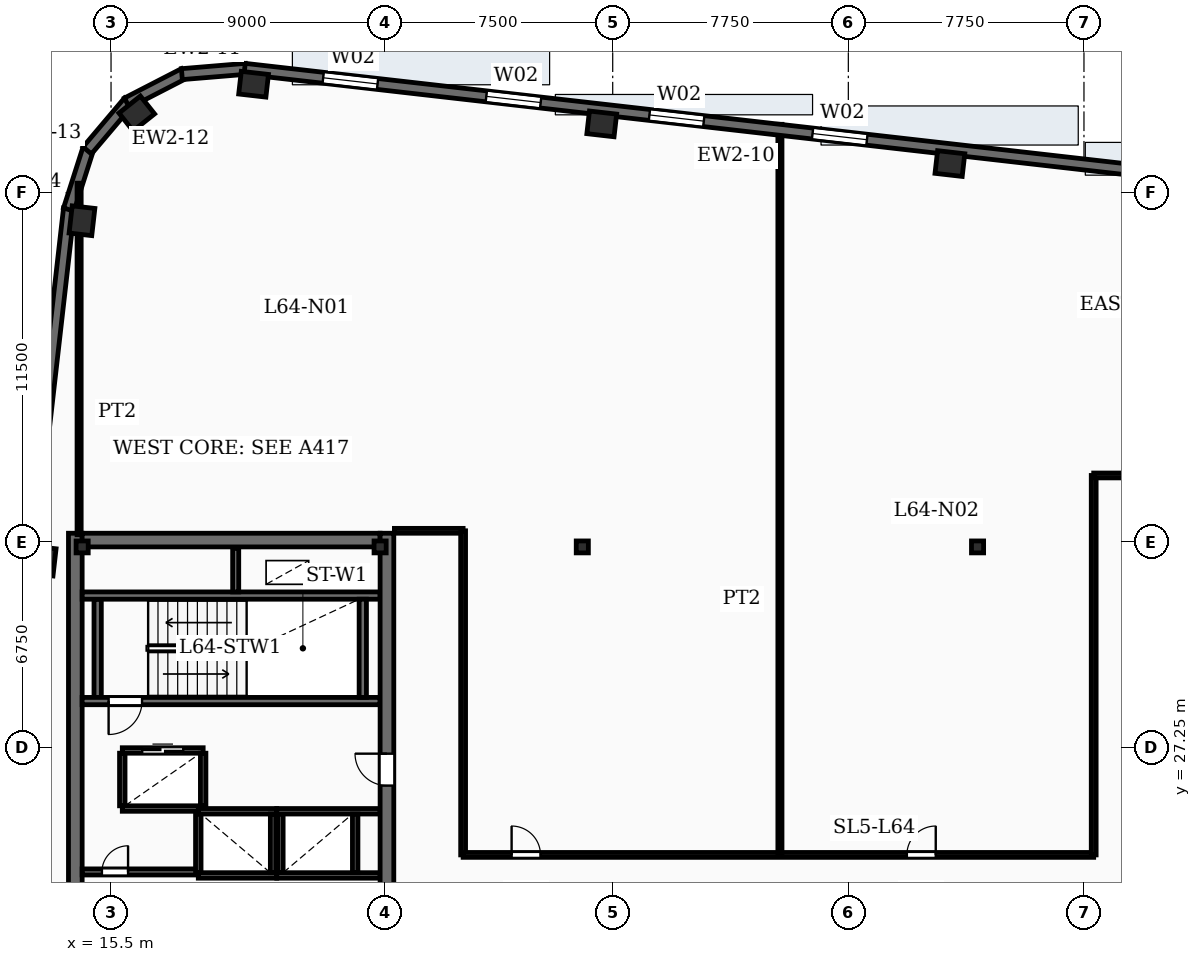
"""IFC4 building model, lengths in metres.
Left out: names, types, materials, properties, quantities, classifications, styles, units other than length and angle.
Written with IfcOpenShell. Run it as: python <this file> out.ifc"""

import sys

from ifc_helpers import new_model, si_unit, direction, frame, frame_2d, origin, origin_2d, place, context, subcontext, project, spatial, rectangle, i_section, extrude, element, fill, save


model = new_model("IFC4")
c1 = context("Model", 3, precision=1e-05, world=origin(), true_north=direction((0.0, 1.0)))
c2 = subcontext(c1, "Body", "Model", "MODEL_VIEW")
j1 = project(units=[si_unit("LENGTHUNIT", "METRE"), si_unit("PLANEANGLEUNIT", "RADIAN")], contexts=[c1])
p1 = place(None, origin())
s1 = spatial("IfcSite", under=j1, at=p1, CompositionType="ELEMENT")
p2 = place(p1, origin())
s2 = spatial("IfcBuilding", under=s1, at=p2, CompositionType="ELEMENT")
p3 = place(p2, frame((0.0, 0.0, 262.2)))
s3 = spatial("IfcBuildingStorey", under=s2, at=p3, CompositionType="ELEMENT", Elevation=262.2)
p4 = place(p3, frame((14.325, 19.0, -0.27), z_axis=(0.0, 0.0, 1.0), x_axis=(0.0, 1.0, 0.0)))
e1 = element("IfcWall", 1, at=p4, inside=s3, PredefinedType="SHEAR", context=c2, shape_type="SweptSolid", body=[
    extrude(rectangle(XDim=15.3, YDim=0.45, at=frame_2d((7.65, 0.0))), origin(), (0.0, 0.0, 1.0), 3.75),
])
p5 = place(p3, frame((24.575, 19.0, -0.27), z_axis=(0.0, 0.0, 1.0), x_axis=(0.0, 1.0, 0.0)))
e2 = element("IfcWall", 2, at=p5, inside=s3, PredefinedType="SHEAR", context=c2, shape_type="SweptSolid", body=[
    extrude(rectangle(XDim=15.3, YDim=0.45, at=frame_2d((7.65, 0.0))), origin(), (0.0, 0.0, 1.0), 3.75),
])
p6 = place(p5, frame((2.5, 0.0, 0.27)))
e3 = element("IfcOpeningElement", 3, at=p6, cuts=e2, PredefinedType="OPENING", context=c2, shape_type="SweptSolid", body=[
    extrude(rectangle(XDim=1.05, YDim=2.15, at=frame_2d((0.525, 1.075))), frame((0.0, 0.235, 0.0), z_axis=(0.0, -1.0, 0.0), x_axis=(1.0, 0.0, 0.0)), (0.0, 0.0, 1.0), 0.47),
])
p7 = place(p5, frame((7.0, 0.0, 0.27)))
e4 = element("IfcOpeningElement", 4, at=p7, cuts=e2, PredefinedType="OPENING", context=c2, shape_type="SweptSolid", body=[
    extrude(rectangle(XDim=1.05, YDim=2.15, at=frame_2d((0.525, 1.075))), frame((0.0, 0.235, 0.0), z_axis=(0.0, -1.0, 0.0), x_axis=(1.0, 0.0, 0.0)), (0.0, 0.0, 1.0), 0.47),
])
p8 = place(p3, frame((14.55, 34.075, -0.27), z_axis=(0.0, 0.0, 1.0), x_axis=(1.0, 0.0, 0.0)))
e5 = element("IfcWall", 5, at=p8, inside=s3, PredefinedType="SHEAR", context=c2, shape_type="SweptSolid", body=[
    extrude(rectangle(XDim=9.8, YDim=0.45, at=frame_2d((4.9, 0.0))), origin(), (0.0, 0.0, 1.0), 3.75),
])
for number, where, z_axis, x_axis in (
    (6, (14.55, 33.85, -0.27), (0.0, 0.0, 1.0), (1.0, 0.0, 0.0)),
    (7, (24.35, 33.85, -0.27), (0.0, 0.0, 1.0), (1.0, 0.0, 0.0)),
    (8, (31.0, 33.85, -0.27), (0.0, 0.0, 1.0), (1.0, 0.0, 0.0)),
    (9, (44.0, 33.85, -0.27), (0.0, 0.0, 1.0), (1.0, 0.0, 0.0)),
):
    element("IfcColumn", number, at=place(p3, frame(where, z_axis=z_axis, x_axis=x_axis)), inside=s3, PredefinedType="COLUMN", context=c2, shape_type="SweptSolid", body=[
        extrude(i_section(OverallWidth=0.399, OverallDepth=0.393, WebThickness=0.023, FlangeThickness=0.037, FilletRadius=0.02, at=origin_2d()), origin(), (0.0, 0.0, 1.0), 3.75),
    ])
for number, where, z_axis, x_axis in (
    (10, (43.091, 46.458, -0.27), (0.0, 0.0, 1.0), (0.994, -0.113, 0.0)),
    (11, (31.64, 47.763, -0.27), (0.0, 0.0, 1.0), (0.994, -0.113, 0.0)),
    (12, (20.189, 49.068, -0.27), (0.0, 0.0, 1.0), (0.994, -0.113, 0.0)),
    (13, (16.346, 48.105, -0.27), (0.0, 0.0, 1.0), (0.783, 0.623, 0.0)),
    (14, (14.544, 44.578, -0.27), (0.0, 0.0, 1.0), (0.113, 0.994, 0.0)),
    (15, (13.269, 33.384, -0.27), (0.0, 0.0, 1.0), (0.113, 0.994, 0.0)),
):
    element("IfcColumn", number, at=place(p3, frame(where, z_axis=z_axis, x_axis=x_axis)), inside=s3, PredefinedType="COLUMN", context=c2, shape_type="SweptSolid", body=[
        extrude(rectangle(XDim=0.9, YDim=0.75, at=origin_2d()), origin(), (0.0, 0.0, 1.0), 3.75),
    ])
p9 = place(p3, frame((19.894, 49.575, 0.0), z_axis=(0.0, 0.0, 1.0), x_axis=(0.993571439016, -0.113206870688, 0.0)))
e16 = element("IfcWall", 16, at=p9, inside=s3, PredefinedType="SOLIDWALL", context=c2, shape_type="SweptSolid", body=[
    extrude(rectangle(XDim=46.8, YDim=0.36, at=frame_2d((23.4, 0.0))), origin(), (0.0, 0.0, 1.0), 3.48),
])
p10 = place(p9, frame((2.6, 0.0, 0.88)))
e17 = element("IfcOpeningElement", 17, at=p10, cuts=e16, PredefinedType="OPENING", context=c2, shape_type="SweptSolid", body=[
    extrude(rectangle(XDim=1.8, YDim=2.15, at=frame_2d((0.9, 1.075))), frame((0.0, 0.19, 0.0), z_axis=(0.0, -1.0, 0.0), x_axis=(1.0, 0.0, 0.0)), (0.0, 0.0, 1.0), 0.38),
])
p11 = place(p9, frame((8.0, 0.0, 0.88)))
e18 = element("IfcOpeningElement", 18, at=p11, cuts=e16, PredefinedType="OPENING", context=c2, shape_type="SweptSolid", body=[
    extrude(rectangle(XDim=1.8, YDim=2.15, at=frame_2d((0.9, 1.075))), frame((0.0, 0.19, 0.0), z_axis=(0.0, -1.0, 0.0), x_axis=(1.0, 0.0, 0.0)), (0.0, 0.0, 1.0), 0.38),
])
p12 = place(p9, frame((13.4, 0.0, 0.88)))
e19 = element("IfcOpeningElement", 19, at=p12, cuts=e16, PredefinedType="OPENING", context=c2, shape_type="SweptSolid", body=[
    extrude(rectangle(XDim=1.8, YDim=2.15, at=frame_2d((0.9, 1.075))), frame((0.0, 0.19, 0.0), z_axis=(0.0, -1.0, 0.0), x_axis=(1.0, 0.0, 0.0)), (0.0, 0.0, 1.0), 0.38),
])
p13 = place(p9, frame((18.8, 0.0, 0.88)))
e20 = element("IfcOpeningElement", 20, at=p13, cuts=e16, PredefinedType="OPENING", context=c2, shape_type="SweptSolid", body=[
    extrude(rectangle(XDim=1.8, YDim=2.15, at=frame_2d((0.9, 1.075))), frame((0.0, 0.19, 0.0), z_axis=(0.0, -1.0, 0.0), x_axis=(1.0, 0.0, 0.0)), (0.0, 0.0, 1.0), 0.38),
])
p14 = place(p9, frame((29.6, 0.0, 0.88)))
e21 = element("IfcOpeningElement", 21, at=p14, cuts=e16, PredefinedType="OPENING", context=c2, shape_type="SweptSolid", body=[
    extrude(rectangle(XDim=1.8, YDim=2.15, at=frame_2d((0.9, 1.075))), frame((0.0, 0.19, 0.0), z_axis=(0.0, -1.0, 0.0), x_axis=(1.0, 0.0, 0.0)), (0.0, 0.0, 1.0), 0.38),
])
for number, where, z_axis, x_axis in (
    (22, (17.83, 49.399, 0.0), (0.0, 0.0, 1.0), (0.997, 0.083, 0.0)),
    (23, (16.024, 48.454, 0.0), (0.0, 0.0, 1.0), (0.889, 0.458, 0.0)),
    (24, (14.718, 46.89, 0.0), (0.0, 0.0, 1.0), (0.646, 0.763, 0.0)),
):
    element("IfcWall", number, at=place(p3, frame(where, z_axis=z_axis, x_axis=x_axis)), inside=s3, PredefinedType="SOLIDWALL", context=c2, shape_type="SweptSolid", body=[
        extrude(rectangle(XDim=2.107, YDim=0.36, at=frame_2d((1.054, 0.0))), origin(), (0.0, 0.0, 1.0), 3.48),
    ])
p15 = place(p3, frame((14.109, 44.945, 0.0), z_axis=(0.0, 0.0, 1.0), x_axis=(0.304872429864, 0.952393196904, 0.0)))
e25 = element("IfcWall", 25, at=p15, inside=s3, PredefinedType="SOLIDWALL", context=c2, shape_type="SweptSolid", body=[
    extrude(rectangle(XDim=2.107, YDim=0.36, at=frame_2d((1.053, 0.0))), origin(), (0.0, 0.0, 1.0), 3.48),
])
p16 = place(p3, frame((10.211, 10.701, 0.0), z_axis=(0.0, 0.0, 1.0), x_axis=(0.113203107947, 0.993571867733, 0.0)))
e26 = element("IfcWall", 26, at=p16, inside=s3, PredefinedType="SOLIDWALL", context=c2, shape_type="SweptSolid", body=[
    extrude(rectangle(XDim=34.5, YDim=0.36, at=frame_2d((17.25, 0.0))), origin(), (0.0, 0.0, 1.0), 3.48),
])
p17 = place(p16, frame((4.2, 0.0, 0.88)))
e27 = element("IfcOpeningElement", 27, at=p17, cuts=e26, PredefinedType="OPENING", context=c2, shape_type="SweptSolid", body=[
    extrude(rectangle(XDim=1.35, YDim=2.2, at=frame_2d((0.675, 1.1))), frame((0.0, 0.19, 0.0), z_axis=(0.0, -1.0, 0.0), x_axis=(1.0, 0.0, 0.0)), (0.0, 0.0, 1.0), 0.38),
])
p18 = place(p16, frame((15.4, 0.0, 0.88)))
e28 = element("IfcOpeningElement", 28, at=p18, cuts=e26, PredefinedType="OPENING", context=c2, shape_type="SweptSolid", body=[
    extrude(rectangle(XDim=1.35, YDim=2.2, at=frame_2d((0.675, 1.1))), frame((0.0, 0.19, 0.0), z_axis=(0.0, -1.0, 0.0), x_axis=(1.0, 0.0, 0.0)), (0.0, 0.0, 1.0), 0.38),
])
p19 = place(p16, frame((26.6, 0.0, 0.88)))
e29 = element("IfcOpeningElement", 29, at=p19, cuts=e26, PredefinedType="OPENING", context=c2, shape_type="SweptSolid", body=[
    extrude(rectangle(XDim=1.35, YDim=2.2, at=frame_2d((0.675, 1.1))), frame((0.0, 0.19, 0.0), z_axis=(0.0, -1.0, 0.0), x_axis=(1.0, 0.0, 0.0)), (0.0, 0.0, 1.0), 0.38),
])
p20 = place(p3, frame((24.35, 28.78, 0.0), z_axis=(0.0, 0.0, 1.0), x_axis=(-1.0, 0.0, 0.0)))
e30 = element("IfcWall", 30, at=p20, inside=s3, PredefinedType="SOLIDWALL", context=c2, shape_type="SweptSolid", body=[
    extrude(rectangle(XDim=9.8, YDim=0.24, at=frame_2d((4.9, 0.0))), origin(), (0.0, 0.0, 1.0), 3.48),
])
p21 = place(p20, frame((7.83, 0.0, 0.0)))
e31 = element("IfcOpeningElement", 31, at=p21, cuts=e30, PredefinedType="OPENING", context=c2, shape_type="SweptSolid", body=[
    extrude(rectangle(XDim=1.1, YDim=2.15, at=frame_2d((0.55, 1.075))), frame((0.0, 0.13, 0.0), z_axis=(0.0, -1.0, 0.0), x_axis=(1.0, 0.0, 0.0)), (0.0, 0.0, 1.0), 0.26),
])
p22 = place(p3, frame((14.55, 32.25, 0.0), z_axis=(0.0, 0.0, 1.0), x_axis=(1.0, 0.0, 0.0)))
e32 = element("IfcWall", 32, at=p22, inside=s3, PredefinedType="SOLIDWALL", context=c2, shape_type="SweptSolid", body=[
    extrude(rectangle(XDim=9.8, YDim=0.24, at=frame_2d((4.9, 0.0))), origin(), (0.0, 0.0, 1.0), 3.48),
])
for number, where, z_axis, x_axis in (
    (33, (15.06, 28.9, 0.0), (0.0, 0.0, 1.0), (0.0, 1.0, 0.0)),
    (34, (23.78, 28.9, 0.0), (0.0, 0.0, 1.0), (0.0, 1.0, 0.0)),
):
    element("IfcWall", number, at=place(p3, frame(where, z_axis=z_axis, x_axis=x_axis)), inside=s3, PredefinedType="SOLIDWALL", context=c2, shape_type="SweptSolid", body=[
        extrude(rectangle(XDim=3.23, YDim=0.24, at=frame_2d((1.615, 0.0))), origin(), (0.0, 0.0, 1.0), 3.48),
    ])
p23 = place(p3, frame((19.6, 32.37, 0.0), z_axis=(0.0, 0.0, 1.0), x_axis=(0.0, 1.0, 0.0)))
e35 = element("IfcWall", 35, at=p23, inside=s3, PredefinedType="SOLIDWALL", context=c2, shape_type="SweptSolid", body=[
    extrude(rectangle(XDim=1.43, YDim=0.2, at=frame_2d((0.715, 0.0))), origin(), (0.0, 0.0, 1.0), 3.48),
])
for number, where, z_axis, x_axis in (
    (36, (18.37, 25.155, 0.0), (0.0, 0.0, 1.0), (1.0, 0.0, 0.0)),
    (37, (18.37, 23.045, 0.0), (0.0, 0.0, 1.0), (1.0, 0.0, 0.0)),
):
    element("IfcWall", number, at=place(p3, frame(where, z_axis=z_axis, x_axis=x_axis)), inside=s3, PredefinedType="SOLIDWALL", context=c2, shape_type="SweptSolid", body=[
        extrude(rectangle(XDim=2.58, YDim=0.18, at=frame_2d((1.29, 0.0))), origin(), (0.0, 0.0, 1.0), 3.48),
    ])
for number, where, z_axis, x_axis in (
    (38, (18.37, 23.135, 0.0), (0.0, 0.0, 1.0), (0.0, 1.0, 0.0)),
    (39, (20.83, 23.135, 0.0), (0.0, 0.0, 1.0), (0.0, 1.0, 0.0)),
):
    element("IfcWall", number, at=place(p3, frame(where, z_axis=z_axis, x_axis=x_axis)), inside=s3, PredefinedType="SOLIDWALL", context=c2, shape_type="SweptSolid", body=[
        extrude(rectangle(XDim=1.93, YDim=0.18, at=frame_2d((0.965, 0.0))), origin(), (0.0, 0.0, 1.0), 3.48),
    ])
for number, where, z_axis, x_axis in (
    (40, (20.95, 25.155, 0.0), (0.0, 0.0, 1.0), (1.0, 0.0, 0.0)),
    (41, (20.95, 23.045, 0.0), (0.0, 0.0, 1.0), (1.0, 0.0, 0.0)),
):
    element("IfcWall", number, at=place(p3, frame(where, z_axis=z_axis, x_axis=x_axis)), inside=s3, PredefinedType="SOLIDWALL", context=c2, shape_type="SweptSolid", body=[
        extrude(rectangle(XDim=3.4, YDim=0.18, at=frame_2d((1.7, 0.0))), origin(), (0.0, 0.0, 1.0), 3.48),
    ])
for number, where, z_axis, x_axis in (
    (42, (21.07, 23.135, 0.0), (0.0, 0.0, 1.0), (0.0, 1.0, 0.0)),
    (43, (23.53, 23.135, 0.0), (0.0, 0.0, 1.0), (0.0, 1.0, 0.0)),
):
    element("IfcWall", number, at=place(p3, frame(where, z_axis=z_axis, x_axis=x_axis)), inside=s3, PredefinedType="SOLIDWALL", context=c2, shape_type="SweptSolid", body=[
        extrude(rectangle(XDim=1.93, YDim=0.18, at=frame_2d((0.965, 0.0))), origin(), (0.0, 0.0, 1.0), 3.48),
    ])
p24 = place(p3, frame((15.87, 27.155, 0.0), z_axis=(0.0, 0.0, 1.0), x_axis=(1.0, 0.0, 0.0)))
e44 = element("IfcWall", 44, at=p24, inside=s3, PredefinedType="SOLIDWALL", context=c2, shape_type="SweptSolid", body=[
    extrude(rectangle(XDim=2.66, YDim=0.18, at=frame_2d((1.33, 0.0))), origin(), (0.0, 0.0, 1.0), 3.48),
])
p25 = place(p24, frame((0.655, 0.0, 0.0)))
e45 = element("IfcOpeningElement", 45, at=p25, cuts=e44, PredefinedType="OPENING", context=c2, shape_type="SweptSolid", body=[
    extrude(rectangle(XDim=1.35, YDim=2.3, at=frame_2d((0.675, 1.15))), frame((0.0, 0.1, 0.0), z_axis=(0.0, -1.0, 0.0), x_axis=(1.0, 0.0, 0.0)), (0.0, 0.0, 1.0), 0.2),
])
p26 = place(p3, frame((15.87, 25.245, 0.0), z_axis=(0.0, 0.0, 1.0), x_axis=(1.0, 0.0, 0.0)))
e46 = element("IfcWall", 46, at=p26, inside=s3, PredefinedType="SOLIDWALL", context=c2, shape_type="SweptSolid", body=[
    extrude(rectangle(XDim=2.66, YDim=0.18, at=frame_2d((1.33, 0.0))), origin(), (0.0, 0.0, 1.0), 3.48),
])
for number, where, z_axis, x_axis in (
    (47, (15.87, 25.335, 0.0), (0.0, 0.0, 1.0), (0.0, 1.0, 0.0)),
    (48, (18.53, 25.335, 0.0), (0.0, 0.0, 1.0), (0.0, 1.0, 0.0)),
):
    element("IfcWall", number, at=place(p3, frame(where, z_axis=z_axis, x_axis=x_axis)), inside=s3, PredefinedType="SOLIDWALL", context=c2, shape_type="SweptSolid", body=[
        extrude(rectangle(XDim=1.73, YDim=0.18, at=frame_2d((0.865, 0.0))), origin(), (0.0, 0.0, 1.0), 3.48),
    ])
p27 = place(p3, frame((14.55, 23.16, 0.0), z_axis=(0.0, 0.0, 1.0), x_axis=(1.0, 0.0, 0.0)))
e49 = element("IfcWall", 49, at=p27, inside=s3, PredefinedType="SOLIDWALL", context=c2, shape_type="SweptSolid", body=[
    extrude(rectangle(XDim=3.82, YDim=0.2, at=frame_2d((1.91, 0.0))), origin(), (0.0, 0.0, 1.0), 2.54),
])
p28 = place(p27, frame((0.65, 0.0, 0.0)))
e50 = element("IfcOpeningElement", 50, at=p28, cuts=e49, PredefinedType="OPENING", context=c2, shape_type="SweptSolid", body=[
    extrude(rectangle(XDim=0.86, YDim=2.05, at=frame_2d((0.43, 1.025))), frame((0.0, 0.11, 0.0), z_axis=(0.0, -1.0, 0.0), x_axis=(1.0, 0.0, 0.0)), (0.0, 0.0, 1.0), 0.22),
])
p29 = place(p3, frame((37.5, 23.72, 0.0), z_axis=(0.0, 0.0, 1.0), x_axis=(0.0, 1.0, 0.0)))
e51 = element("IfcWall", 51, at=p29, inside=s3, PredefinedType="PARTITIONING", context=c2, shape_type="SweptSolid", body=[
    extrude(rectangle(XDim=24.03, YDim=0.135, at=frame_2d((12.015, 0.0))), origin(), (0.0, 0.0, 1.0), 2.54),
])
p30 = place(p3, frame((14.45, 34.25, 0.0), z_axis=(0.0, 0.0, 1.0), x_axis=(0.0, 1.0, 0.0)))
e52 = element("IfcWall", 52, at=p30, inside=s3, PredefinedType="PARTITIONING", context=c2, shape_type="SweptSolid", body=[
    extrude(rectangle(XDim=11.562, YDim=0.135, at=frame_2d((5.781, 0.0))), origin(), (0.0, 0.0, 1.0), 2.54),
])
p31 = place(p3, frame((27.08, 23.72, 0.0), z_axis=(0.0, 0.0, 1.0), x_axis=(1.0, 0.0, 0.0)))
e53 = element("IfcWall", 53, at=p31, inside=s3, PredefinedType="PARTITIONING", context=c2, shape_type="SweptSolid", body=[
    extrude(rectangle(XDim=20.74, YDim=0.16, at=frame_2d((10.37, 0.0))), origin(), (0.0, 0.0, 1.0), 2.54),
])
p32 = place(p31, frame((1.595, 0.0, 0.0)))
e54 = element("IfcOpeningElement", 54, at=p32, cuts=e53, PredefinedType="OPENING", context=c2, shape_type="SweptSolid", body=[
    extrude(rectangle(XDim=0.95, YDim=2.15, at=frame_2d((0.475, 1.075))), frame((0.0, 0.09, 0.0), z_axis=(0.0, -1.0, 0.0), x_axis=(1.0, 0.0, 0.0)), (0.0, 0.0, 1.0), 0.18),
])
p33 = place(p31, frame((14.595, 0.0, 0.0)))
e55 = element("IfcOpeningElement", 55, at=p33, cuts=e53, PredefinedType="OPENING", context=c2, shape_type="SweptSolid", body=[
    extrude(rectangle(XDim=0.95, YDim=2.15, at=frame_2d((0.475, 1.075))), frame((0.0, 0.09, 0.0), z_axis=(0.0, -1.0, 0.0), x_axis=(1.0, 0.0, 0.0)), (0.0, 0.0, 1.0), 0.18),
])
p34 = place(p3, frame((27.08, 23.72, 0.0), z_axis=(0.0, 0.0, 1.0), x_axis=(0.0, 1.0, 0.0)))
e56 = element("IfcWall", 56, at=p34, inside=s3, PredefinedType="PARTITIONING", context=c2, shape_type="SweptSolid", body=[
    extrude(rectangle(XDim=10.66, YDim=0.16, at=frame_2d((5.33, 0.0))), origin(), (0.0, 0.0, 1.0), 2.54),
])
p35 = place(p3, frame((24.82, 34.38, 0.0), z_axis=(0.0, 0.0, 1.0), x_axis=(1.0, 0.0, 0.0)))
e57 = element("IfcWall", 57, at=p35, inside=s3, PredefinedType="PARTITIONING", context=c2, shape_type="SweptSolid", body=[
    extrude(rectangle(XDim=2.26, YDim=0.16, at=frame_2d((1.13, 0.0))), origin(), (0.0, 0.0, 1.0), 2.54),
])
p36 = place(p3, frame((47.82, 23.72, 0.0), z_axis=(0.0, 0.0, 1.0), x_axis=(0.0, 1.0, 0.0)))
e58 = element("IfcWall", 58, at=p36, inside=s3, PredefinedType="PARTITIONING", context=c2, shape_type="SweptSolid", body=[
    extrude(rectangle(XDim=12.48, YDim=0.16, at=frame_2d((6.24, 0.0))), origin(), (0.0, 0.0, 1.0), 2.54),
])
p37 = place(p3, frame((47.82, 36.2, 0.0), z_axis=(0.0, 0.0, 1.0), x_axis=(1.0, 0.0, 0.0)))
e59 = element("IfcWall", 59, at=p37, inside=s3, PredefinedType="PARTITIONING", context=c2, shape_type="SweptSolid", body=[
    extrude(rectangle(XDim=2.26, YDim=0.16, at=frame_2d((1.13, 0.0))), origin(), (0.0, 0.0, 1.0), 2.54),
])
p38 = place(p10, origin())
e60 = element("IfcWindow", 60, at=p38, inside=s3, PartitioningType="DOUBLE_PANEL_VERTICAL", PredefinedType="WINDOW", context=c2, shape_type="SweptSolid", body=[
    extrude(rectangle(XDim=1.8, YDim=2.15, at=frame_2d((0.9, 1.075))), frame((0.0, 0.03, 0.0), z_axis=(0.0, -1.0, 0.0), x_axis=(1.0, 0.0, 0.0)), (0.0, 0.0, 1.0), 0.06),
])
fill(e17, e60)
p39 = place(p11, origin())
e61 = element("IfcWindow", 61, at=p39, inside=s3, PartitioningType="DOUBLE_PANEL_VERTICAL", PredefinedType="WINDOW", context=c2, shape_type="SweptSolid", body=[
    extrude(rectangle(XDim=1.8, YDim=2.15, at=frame_2d((0.9, 1.075))), frame((0.0, 0.03, 0.0), z_axis=(0.0, -1.0, 0.0), x_axis=(1.0, 0.0, 0.0)), (0.0, 0.0, 1.0), 0.06),
])
fill(e18, e61)
p40 = place(p12, origin())
e62 = element("IfcWindow", 62, at=p40, inside=s3, PartitioningType="DOUBLE_PANEL_VERTICAL", PredefinedType="WINDOW", context=c2, shape_type="SweptSolid", body=[
    extrude(rectangle(XDim=1.8, YDim=2.15, at=frame_2d((0.9, 1.075))), frame((0.0, 0.03, 0.0), z_axis=(0.0, -1.0, 0.0), x_axis=(1.0, 0.0, 0.0)), (0.0, 0.0, 1.0), 0.06),
])
fill(e19, e62)
p41 = place(p13, origin())
e63 = element("IfcWindow", 63, at=p41, inside=s3, PartitioningType="DOUBLE_PANEL_VERTICAL", PredefinedType="WINDOW", context=c2, shape_type="SweptSolid", body=[
    extrude(rectangle(XDim=1.8, YDim=2.15, at=frame_2d((0.9, 1.075))), frame((0.0, 0.03, 0.0), z_axis=(0.0, -1.0, 0.0), x_axis=(1.0, 0.0, 0.0)), (0.0, 0.0, 1.0), 0.06),
])
fill(e20, e63)
p42 = place(p7, origin())
e64 = element("IfcDoor", 64, at=p42, inside=s3, OperationType="SINGLE_SWING_RIGHT", PredefinedType="DOOR", context=c2, shape_type="SweptSolid", body=[
    extrude(rectangle(XDim=1.05, YDim=2.15, at=frame_2d((0.525, 1.075))), frame((0.0, 0.025, 0.0), z_axis=(0.0, -1.0, 0.0), x_axis=(1.0, 0.0, 0.0)), (0.0, 0.0, 1.0), 0.05),
])
fill(e4, e64)
p43 = place(p21, origin())
e65 = element("IfcDoor", 65, at=p43, inside=s3, OperationType="SINGLE_SWING_RIGHT", PredefinedType="DOOR", context=c2, shape_type="SweptSolid", body=[
    extrude(rectangle(XDim=1.1, YDim=2.15, at=frame_2d((0.55, 1.075))), frame((0.0, 0.025, 0.0), z_axis=(0.0, -1.0, 0.0), x_axis=(1.0, 0.0, 0.0)), (0.0, 0.0, 1.0), 0.05),
])
fill(e31, e65)
p44 = place(p25, origin())
e66 = element("IfcDoor", 66, at=p44, inside=s3, OperationType="DOUBLE_DOOR_SLIDING", PredefinedType="DOOR", context=c2, shape_type="SweptSolid", body=[
    extrude(rectangle(XDim=1.35, YDim=2.3, at=frame_2d((0.675, 1.15))), frame((0.0, 0.025, 0.0), z_axis=(0.0, -1.0, 0.0), x_axis=(1.0, 0.0, 0.0)), (0.0, 0.0, 1.0), 0.05),
])
fill(e45, e66)
p45 = place(p28, origin())
e67 = element("IfcDoor", 67, at=p45, inside=s3, OperationType="SINGLE_SWING_RIGHT", PredefinedType="DOOR", context=c2, shape_type="SweptSolid", body=[
    extrude(rectangle(XDim=0.86, YDim=2.05, at=frame_2d((0.43, 1.025))), frame((0.0, 0.025, 0.0), z_axis=(0.0, -1.0, 0.0), x_axis=(1.0, 0.0, 0.0)), (0.0, 0.0, 1.0), 0.05),
])
fill(e50, e67)
p46 = place(p32, origin())
e68 = element("IfcDoor", 68, at=p46, inside=s3, OperationType="SINGLE_SWING_LEFT", PredefinedType="DOOR", context=c2, shape_type="SweptSolid", body=[
    extrude(rectangle(XDim=0.95, YDim=2.15, at=frame_2d((0.475, 1.075))), frame((0.0, 0.025, 0.0), z_axis=(0.0, -1.0, 0.0), x_axis=(1.0, 0.0, 0.0)), (0.0, 0.0, 1.0), 0.05),
])
fill(e54, e68)
p47 = place(p33, origin())
e69 = element("IfcDoor", 69, at=p47, inside=s3, OperationType="SINGLE_SWING_RIGHT", PredefinedType="DOOR", context=c2, shape_type="SweptSolid", body=[
    extrude(rectangle(XDim=0.95, YDim=2.15, at=frame_2d((0.475, 1.075))), frame((0.0, 0.025, 0.0), z_axis=(0.0, -1.0, 0.0), x_axis=(1.0, 0.0, 0.0)), (0.0, 0.0, 1.0), 0.05),
])
fill(e55, e69)
save(model, sys.argv[1])
